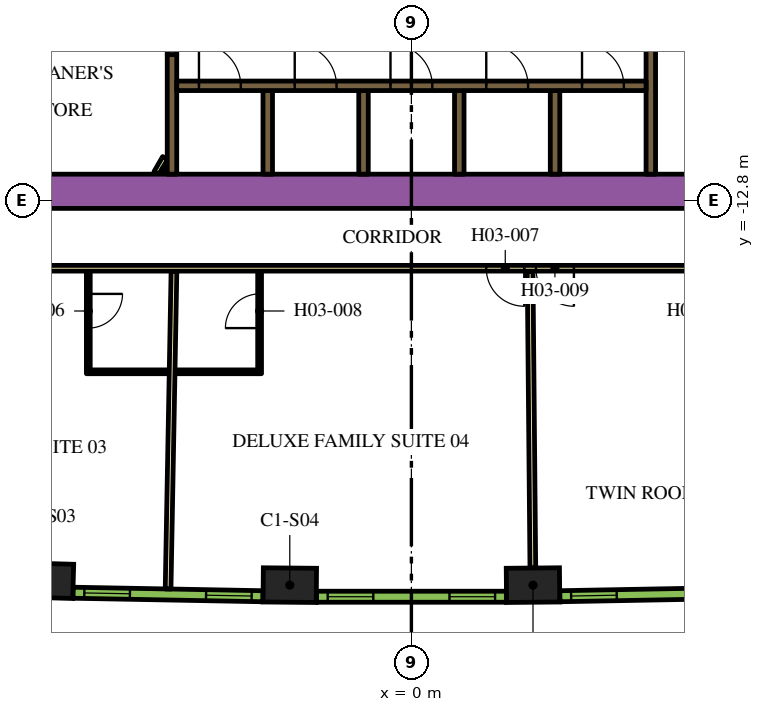
"""IFC4 building model, lengths in metres.
Left out: names, types, materials, properties, quantities, classifications, styles, units other than length and angle.
Written with IfcOpenShell. Run it as: python <this file> out.ifc"""

import sys

from ifc_helpers import new_model, si_unit, direction, frame, frame_2d, origin, origin_2d, place, context, subcontext, project, spatial, rectangle, extrude, element, fill, save


model = new_model("IFC4")
c1 = context("Model", 3, precision=1e-05, world=origin(), true_north=direction((0.0, 1.0)))
c2 = subcontext(c1, "Body", "Model", "MODEL_VIEW")
j1 = project(units=[si_unit("LENGTHUNIT", "METRE"), si_unit("PLANEANGLEUNIT", "RADIAN")], contexts=[c1])
p1 = place(None, origin())
s1 = spatial("IfcSite", under=j1, at=p1, CompositionType="ELEMENT")
p2 = place(p1, origin())
s2 = spatial("IfcBuilding", under=s1, at=p2, CompositionType="ELEMENT")
p3 = place(p2, frame((0.0, 0.0, 54.9)))
s3 = spatial("IfcBuildingStorey", under=s2, at=p3, CompositionType="ELEMENT", Elevation=54.9)
for number, where, z_axis, x_axis in (
    (1, (-9.599, -22.795, 0.0), (0.0, 0.0, 1.0), (1.0, -0.028, 0.0)),
    (2, (-3.2, -22.913, 0.0), (0.0, 0.0, 1.0), (1.0, -0.009, 0.0)),
    (3, (3.2, -22.913, 0.0), (0.0, 0.0, 1.0), (1.0, 0.009, 0.0)),
):
    element("IfcColumn", number, at=place(p3, frame(where, z_axis=z_axis, x_axis=x_axis)), inside=s3, PredefinedType="COLUMN", context=c2, shape_type="SweptSolid", body=[
        extrude(rectangle(XDim=1.4, YDim=0.9, at=origin_2d()), origin(), (0.0, 0.0, 1.0), 3.9),
    ])
p4 = place(p3, frame((-12.019, -12.55, 0.0), z_axis=(0.0, 0.0, 1.0), x_axis=(1.0, 0.0, 0.0)))
e4 = element("IfcWall", 4, at=p4, inside=s3, PredefinedType="SOLIDWALL", context=c2, shape_type="SweptSolid", body=[
    extrude(rectangle(XDim=21.63, YDim=0.9, at=frame_2d((10.815, 0.0))), origin(), (0.0, 0.0, 1.0), 3.9),
])
p5 = place(p3, frame((12.84, -9.261, 0.0), z_axis=(0.0, 0.0, 1.0), x_axis=(-0.866013990052, 0.500019768644, 0.0)))
e5 = element("IfcWall", 5, at=p5, inside=s3, PredefinedType="SOLIDWALL", context=c2, shape_type="SweptSolid", body=[
    extrude(rectangle(XDim=6.8, YDim=0.25, at=frame_2d((3.4, 0.0))), origin(), (0.0, 0.0, 1.0), 3.9),
])
p6 = place(p3, frame((-12.84, -9.261, 0.0), z_axis=(0.0, 0.0, 1.0), x_axis=(0.866016039709, 0.500016218704, 0.0)))
e6 = element("IfcWall", 6, at=p6, inside=s3, PredefinedType="SOLIDWALL", context=c2, shape_type="SweptSolid", body=[
    extrude(rectangle(XDim=7.05, YDim=0.25, at=frame_2d((3.525, 0.0))), origin(), (0.0, 0.0, 1.0), 3.9),
])
p7 = place(p3, frame((-3.78, -12.1, 0.0), z_axis=(0.0, 0.0, 1.0), x_axis=(0.0, 1.0, 0.0)))
e7 = element("IfcWall", 7, at=p7, inside=s3, PredefinedType="SOLIDWALL", context=c2, shape_type="SweptSolid", body=[
    extrude(rectangle(XDim=2.2, YDim=0.25, at=frame_2d((1.1, 0.0))), origin(), (0.0, 0.0, 1.0), 3.9),
])
p8 = place(p3, frame((-6.3, -12.1, 0.0), z_axis=(0.0, 0.0, 1.0), x_axis=(0.0, 1.0, 0.0)))
e8 = element("IfcWall", 8, at=p8, inside=s3, PredefinedType="SOLIDWALL", context=c2, shape_type="SweptSolid", body=[
    extrude(rectangle(XDim=3.146, YDim=0.25, at=frame_2d((1.573, 0.0))), origin(), (0.0, 0.0, 1.0), 3.9),
])
p9 = place(p3, frame((6.3, -8.67, 0.0), z_axis=(0.0, 0.0, 1.0), x_axis=(0.0, -1.0, 0.0)))
e9 = element("IfcWall", 9, at=p9, inside=s3, PredefinedType="SOLIDWALL", context=c2, shape_type="SweptSolid", body=[
    extrude(rectangle(XDim=3.43, YDim=0.25, at=frame_2d((1.715, 0.0))), origin(), (0.0, 0.0, 1.0), 3.9),
])
for number, where, z_axis, x_axis in (
    (10, (3.78, -12.1, 0.0), (0.0, 0.0, 1.0), (0.0, 1.0, 0.0)),
    (11, (1.26, -12.1, 0.0), (0.0, 0.0, 1.0), (0.0, 1.0, 0.0)),
    (12, (-1.26, -12.1, 0.0), (0.0, 0.0, 1.0), (0.0, 1.0, 0.0)),
):
    element("IfcWall", number, at=place(p3, frame(where, z_axis=z_axis, x_axis=x_axis)), inside=s3, PredefinedType="SOLIDWALL", context=c2, shape_type="SweptSolid", body=[
        extrude(rectangle(XDim=2.2, YDim=0.25, at=frame_2d((1.1, 0.0))), origin(), (0.0, 0.0, 1.0), 3.9),
    ])
p10 = place(p3, frame((-6.708, -12.068, 0.0), z_axis=(0.0, 0.0, 1.0), x_axis=(0.500000789788, 0.8660249478, 0.0)))
e13 = element("IfcWall", 13, at=p10, inside=s3, PredefinedType="PARTITIONING", context=c2, shape_type="SweptSolid", body=[
    extrude(rectangle(XDim=0.456, YDim=0.15, at=frame_2d((0.228, 0.0))), origin(), (0.0, 0.0, 1.0), 2.75),
])
p11 = place(p3, frame((-6.534, -12.068, 0.0), z_axis=(0.0, 0.0, 1.0), x_axis=(0.500240224089, 0.865886665912, 0.0)))
e14 = element("IfcWall", 14, at=p11, inside=s3, PredefinedType="PARTITIONING", context=c2, shape_type="SweptSolid", body=[
    extrude(rectangle(XDim=0.109, YDim=0.15, at=frame_2d((0.054, 0.0))), origin(), (0.0, 0.0, 1.0), 2.75),
])
p12 = place(p3, frame((-6.175, -9.775, 0.0), z_axis=(0.0, 0.0, 1.0), x_axis=(1.0, 0.0, 0.0)))
e15 = element("IfcWall", 15, at=p12, inside=s3, PredefinedType="SOLIDWALL", context=c2, shape_type="SweptSolid", body=[
    extrude(rectangle(XDim=12.35, YDim=0.25, at=frame_2d((6.175, 0.0))), origin(), (0.0, 0.0, 1.0), 3.9),
])
p13 = place(p12, frame((0.585, 0.0, 0.0)))
e16 = element("IfcOpeningElement", 16, at=p13, cuts=e15, PredefinedType="OPENING", context=c2, shape_type="SweptSolid", body=[
    extrude(rectangle(XDim=1.1, YDim=2.1, at=frame_2d((0.55, 1.05))), frame((0.0, 0.135, 0.0), z_axis=(0.0, -1.0, 0.0), x_axis=(1.0, 0.0, 0.0)), (0.0, 0.0, 1.0), 0.27),
])
p14 = place(p12, frame((3.105, 0.0, 0.0)))
e17 = element("IfcOpeningElement", 17, at=p14, cuts=e15, PredefinedType="OPENING", context=c2, shape_type="SweptSolid", body=[
    extrude(rectangle(XDim=1.1, YDim=2.1, at=frame_2d((0.55, 1.05))), frame((0.0, 0.135, 0.0), z_axis=(0.0, -1.0, 0.0), x_axis=(1.0, 0.0, 0.0)), (0.0, 0.0, 1.0), 0.27),
])
p15 = place(p12, frame((5.625, 0.0, 0.0)))
e18 = element("IfcOpeningElement", 18, at=p15, cuts=e15, PredefinedType="OPENING", context=c2, shape_type="SweptSolid", body=[
    extrude(rectangle(XDim=1.1, YDim=2.1, at=frame_2d((0.55, 1.05))), frame((0.0, 0.135, 0.0), z_axis=(0.0, -1.0, 0.0), x_axis=(1.0, 0.0, 0.0)), (0.0, 0.0, 1.0), 0.27),
])
p16 = place(p12, frame((8.145, 0.0, 0.0)))
e19 = element("IfcOpeningElement", 19, at=p16, cuts=e15, PredefinedType="OPENING", context=c2, shape_type="SweptSolid", body=[
    extrude(rectangle(XDim=1.1, YDim=2.1, at=frame_2d((0.55, 1.05))), frame((0.0, 0.135, 0.0), z_axis=(0.0, -1.0, 0.0), x_axis=(1.0, 0.0, 0.0)), (0.0, 0.0, 1.0), 0.27),
])
p17 = place(p12, frame((10.665, 0.0, 0.0)))
e20 = element("IfcOpeningElement", 20, at=p17, cuts=e15, PredefinedType="OPENING", context=c2, shape_type="SweptSolid", body=[
    extrude(rectangle(XDim=1.1, YDim=2.1, at=frame_2d((0.55, 1.05))), frame((0.0, 0.135, 0.0), z_axis=(0.0, -1.0, 0.0), x_axis=(1.0, 0.0, 0.0)), (0.0, 0.0, 1.0), 0.27),
])
p18 = place(p3, frame((-6.3, -7.154, 0.0), z_axis=(0.0, 0.0, 1.0), x_axis=(0.0, -1.0, 0.0)))
e21 = element("IfcWall", 21, at=p18, inside=s3, PredefinedType="SOLIDWALL", context=c2, shape_type="SweptSolid", body=[
    extrude(rectangle(XDim=1.8, YDim=0.25, at=frame_2d((0.9, 0.0))), origin(), (0.0, 0.0, 1.0), 3.9),
])
p19 = place(p18, frame((0.45, 0.0, 0.0)))
e22 = element("IfcOpeningElement", 22, at=p19, cuts=e21, PredefinedType="OPENING", context=c2, shape_type="SweptSolid", body=[
    extrude(rectangle(XDim=0.9, YDim=2.1, at=frame_2d((0.45, 1.05))), frame((0.0, 0.135, 0.0), z_axis=(0.0, -1.0, 0.0), x_axis=(1.0, 0.0, 0.0)), (0.0, 0.0, 1.0), 0.27),
])
p20 = place(p3, frame((12.918, -14.575, 0.0), z_axis=(0.0, 0.0, 1.0), x_axis=(-1.0, 0.0, 0.0)))
e23 = element("IfcWall", 23, at=p20, inside=s3, PredefinedType="PARTITIONING", context=c2, shape_type="SweptSolid", body=[
    extrude(rectangle(XDim=25.766, YDim=0.15, at=frame_2d((12.883, 0.0))), origin(), (0.0, 0.0, 1.0), 2.75),
])
p21 = place(p20, frame((24.586, 0.0, 0.0)))
e24 = element("IfcOpeningElement", 24, at=p21, cuts=e23, PredefinedType="OPENING", context=c2, shape_type="SweptSolid", body=[
    extrude(rectangle(XDim=1.0, YDim=2.1, at=frame_2d((0.5, 1.05))), frame((0.0, 0.085, 0.0), z_axis=(0.0, -1.0, 0.0), x_axis=(1.0, 0.0, 0.0)), (0.0, 0.0, 1.0), 0.17),
])
p22 = place(p20, frame((9.948, 0.0, 0.0)))
e25 = element("IfcOpeningElement", 25, at=p22, cuts=e23, PredefinedType="OPENING", context=c2, shape_type="SweptSolid", body=[
    extrude(rectangle(XDim=1.0, YDim=2.1, at=frame_2d((0.5, 1.05))), frame((0.0, 0.085, 0.0), z_axis=(0.0, -1.0, 0.0), x_axis=(1.0, 0.0, 0.0)), (0.0, 0.0, 1.0), 0.17),
])
p23 = place(p20, frame((8.642, 0.0, 0.0)))
e26 = element("IfcOpeningElement", 26, at=p23, cuts=e23, PredefinedType="OPENING", context=c2, shape_type="SweptSolid", body=[
    extrude(rectangle(XDim=1.0, YDim=2.1, at=frame_2d((0.5, 1.05))), frame((0.0, 0.085, 0.0), z_axis=(0.0, -1.0, 0.0), x_axis=(1.0, 0.0, 0.0)), (0.0, 0.0, 1.0), 0.17),
])
p24 = place(p20, frame((0.18, 0.0, 0.0)))
e27 = element("IfcOpeningElement", 27, at=p24, cuts=e23, PredefinedType="OPENING", context=c2, shape_type="SweptSolid", body=[
    extrude(rectangle(XDim=1.0, YDim=2.1, at=frame_2d((0.5, 1.05))), frame((0.0, 0.085, 0.0), z_axis=(0.0, -1.0, 0.0), x_axis=(1.0, 0.0, 0.0)), (0.0, 0.0, 1.0), 0.17),
])
p25 = place(p3, frame((-6.402, -23.014, 0.0), z_axis=(0.0, 0.0, 1.0), x_axis=(0.01849587109, 0.999828936745, 0.0)))
e28 = element("IfcWall", 28, at=p25, inside=s3, PredefinedType="PARTITIONING", context=c2, shape_type="SweptSolid", body=[
    extrude(rectangle(XDim=8.355, YDim=0.15, at=frame_2d((4.178, 0.0))), origin(), (0.0, 0.0, 1.0), 2.75),
])
p26 = place(p3, frame((3.196, -22.463, 0.0), z_axis=(0.0, 0.0, 1.0), x_axis=(-0.00926060032, 0.999957119721, 0.0)))
e29 = element("IfcWall", 29, at=p26, inside=s3, PredefinedType="PARTITIONING", context=c2, shape_type="SweptSolid", body=[
    extrude(rectangle(XDim=7.803, YDim=0.15, at=frame_2d((3.902, 0.0))), origin(), (0.0, 0.0, 1.0), 2.75),
])
p27 = place(p3, frame((-8.502, -14.65, 0.0), z_axis=(0.0, 0.0, 1.0), x_axis=(0.0, -1.0, 0.0)))
e30 = element("IfcWall", 30, at=p27, inside=s3, PredefinedType="PARTITIONING", context=c2, shape_type="SweptSolid", body=[
    extrude(rectangle(XDim=2.7, YDim=0.1, at=frame_2d((1.35, 0.0))), origin(), (0.0, 0.0, 1.0), 2.75),
])
p28 = place(p27, frame((0.6, 0.0, 0.0)))
e31 = element("IfcOpeningElement", 31, at=p28, cuts=e30, PredefinedType="OPENING", context=c2, shape_type="SweptSolid", body=[
    extrude(rectangle(XDim=0.9, YDim=2.1, at=frame_2d((0.45, 1.05))), frame((0.0, 0.06, 0.0), z_axis=(0.0, -1.0, 0.0), x_axis=(1.0, 0.0, 0.0)), (0.0, 0.0, 1.0), 0.12),
])
p29 = place(p3, frame((-8.452, -17.3, 0.0), z_axis=(0.0, 0.0, 1.0), x_axis=(1.0, 0.0, 0.0)))
e32 = element("IfcWall", 32, at=p29, inside=s3, PredefinedType="PARTITIONING", context=c2, shape_type="SweptSolid", body=[
    extrude(rectangle(XDim=2.07, YDim=0.1, at=frame_2d((1.035, 0.0))), origin(), (0.0, 0.0, 1.0), 2.75),
])
p30 = place(p3, frame((-3.994, -17.35, 0.0), z_axis=(0.0, 0.0, 1.0), x_axis=(0.0, 1.0, 0.0)))
e33 = element("IfcWall", 33, at=p30, inside=s3, PredefinedType="PARTITIONING", context=c2, shape_type="SweptSolid", body=[
    extrude(rectangle(XDim=2.7, YDim=0.1, at=frame_2d((1.35, 0.0))), origin(), (0.0, 0.0, 1.0), 2.75),
])
p31 = place(p30, frame((1.2, 0.0, 0.0)))
e34 = element("IfcOpeningElement", 34, at=p31, cuts=e33, PredefinedType="OPENING", context=c2, shape_type="SweptSolid", body=[
    extrude(rectangle(XDim=0.9, YDim=2.1, at=frame_2d((0.45, 1.05))), frame((0.0, 0.06, 0.0), z_axis=(0.0, -1.0, 0.0), x_axis=(1.0, 0.0, 0.0)), (0.0, 0.0, 1.0), 0.12),
])
p32 = place(p3, frame((-4.044, -17.3, 0.0), z_axis=(0.0, 0.0, 1.0), x_axis=(-1.0, 0.0, 0.0)))
e35 = element("IfcWall", 35, at=p32, inside=s3, PredefinedType="PARTITIONING", context=c2, shape_type="SweptSolid", body=[
    extrude(rectangle(XDim=2.17, YDim=0.1, at=frame_2d((1.085, 0.0))), origin(), (0.0, 0.0, 1.0), 2.75),
])
p33 = place(p3, frame((-8.904, -23.113, 0.0), z_axis=(0.0, 0.0, 1.0), x_axis=(0.999829529479, -0.018463801951, 0.0)))
e36 = element("IfcWall", 36, at=p33, inside=s3, PredefinedType="SOLIDWALL", context=c2, shape_type="SweptSolid", body=[
    extrude(rectangle(XDim=4.998, YDim=0.29, at=frame_2d((2.499, 0.0))), origin(), (0.0, 0.0, 1.0), 3.65),
])
p34 = place(p33, frame((0.297, 0.0, 0.9)))
e37 = element("IfcOpeningElement", 37, at=p34, cuts=e36, PredefinedType="OPENING", context=c2, shape_type="SweptSolid", body=[
    extrude(rectangle(XDim=1.2, YDim=2.15, at=frame_2d((0.6, 1.075))), frame((0.0, 0.155, 0.0), z_axis=(0.0, -1.0, 0.0), x_axis=(1.0, 0.0, 0.0)), (0.0, 0.0, 1.0), 0.31),
])
p35 = place(p33, frame((3.501, 0.0, 0.9)))
e38 = element("IfcOpeningElement", 38, at=p35, cuts=e36, PredefinedType="OPENING", context=c2, shape_type="SweptSolid", body=[
    extrude(rectangle(XDim=1.2, YDim=2.15, at=frame_2d((0.6, 1.075))), frame((0.0, 0.155, 0.0), z_axis=(0.0, -1.0, 0.0), x_axis=(1.0, 0.0, 0.0)), (0.0, 0.0, 1.0), 0.31),
])
p36 = place(p3, frame((-2.499, -23.218, 0.0), z_axis=(0.0, 0.0, 1.0), x_axis=(1.0, 0.0, 0.0)))
e39 = element("IfcWall", 39, at=p36, inside=s3, PredefinedType="SOLIDWALL", context=c2, shape_type="SweptSolid", body=[
    extrude(rectangle(XDim=4.998, YDim=0.29, at=frame_2d((2.499, 0.0))), origin(), (0.0, 0.0, 1.0), 3.65),
])
p37 = place(p36, frame((0.297, 0.0, 0.9)))
e40 = element("IfcOpeningElement", 40, at=p37, cuts=e39, PredefinedType="OPENING", context=c2, shape_type="SweptSolid", body=[
    extrude(rectangle(XDim=1.2, YDim=2.15, at=frame_2d((0.6, 1.075))), frame((0.0, 0.155, 0.0), z_axis=(0.0, -1.0, 0.0), x_axis=(1.0, 0.0, 0.0)), (0.0, 0.0, 1.0), 0.31),
])
p38 = place(p36, frame((3.501, 0.0, 0.9)))
e41 = element("IfcOpeningElement", 41, at=p38, cuts=e39, PredefinedType="OPENING", context=c2, shape_type="SweptSolid", body=[
    extrude(rectangle(XDim=1.2, YDim=2.15, at=frame_2d((0.6, 1.075))), frame((0.0, 0.155, 0.0), z_axis=(0.0, -1.0, 0.0), x_axis=(1.0, 0.0, 0.0)), (0.0, 0.0, 1.0), 0.31),
])
p39 = place(p3, frame((3.906, -23.205, 0.0), z_axis=(0.0, 0.0, 1.0), x_axis=(0.999829529479, 0.018463801951, 0.0)))
e42 = element("IfcWall", 42, at=p39, inside=s3, PredefinedType="SOLIDWALL", context=c2, shape_type="SweptSolid", body=[
    extrude(rectangle(XDim=4.998, YDim=0.29, at=frame_2d((2.499, 0.0))), origin(), (0.0, 0.0, 1.0), 3.65),
])
p40 = place(p39, frame((0.297, 0.0, 0.9)))
e43 = element("IfcOpeningElement", 43, at=p40, cuts=e42, PredefinedType="OPENING", context=c2, shape_type="SweptSolid", body=[
    extrude(rectangle(XDim=1.2, YDim=2.15, at=frame_2d((0.6, 1.075))), frame((0.0, 0.155, 0.0), z_axis=(0.0, -1.0, 0.0), x_axis=(1.0, 0.0, 0.0)), (0.0, 0.0, 1.0), 0.31),
])
p41 = place(p39, frame((3.501, 0.0, 0.9)))
e44 = element("IfcOpeningElement", 44, at=p41, cuts=e42, PredefinedType="OPENING", context=c2, shape_type="SweptSolid", body=[
    extrude(rectangle(XDim=1.2, YDim=2.15, at=frame_2d((0.6, 1.075))), frame((0.0, 0.155, 0.0), z_axis=(0.0, -1.0, 0.0), x_axis=(1.0, 0.0, 0.0)), (0.0, 0.0, 1.0), 0.31),
])
p42 = place(p13, origin())
e45 = element("IfcDoor", 45, at=p42, inside=s3, OperationType="DOUBLE_DOOR_SLIDING", PredefinedType="DOOR", context=c2, shape_type="SweptSolid", body=[
    extrude(rectangle(XDim=1.1, YDim=2.1, at=frame_2d((0.55, 1.05))), frame((0.0, 0.025, 0.0), z_axis=(0.0, -1.0, 0.0), x_axis=(1.0, 0.0, 0.0)), (0.0, 0.0, 1.0), 0.05),
])
fill(e16, e45)
p43 = place(p14, origin())
e46 = element("IfcDoor", 46, at=p43, inside=s3, OperationType="DOUBLE_DOOR_SLIDING", PredefinedType="DOOR", context=c2, shape_type="SweptSolid", body=[
    extrude(rectangle(XDim=1.1, YDim=2.1, at=frame_2d((0.55, 1.05))), frame((0.0, 0.025, 0.0), z_axis=(0.0, -1.0, 0.0), x_axis=(1.0, 0.0, 0.0)), (0.0, 0.0, 1.0), 0.05),
])
fill(e17, e46)
p44 = place(p15, origin())
e47 = element("IfcDoor", 47, at=p44, inside=s3, OperationType="DOUBLE_DOOR_SLIDING", PredefinedType="DOOR", context=c2, shape_type="SweptSolid", body=[
    extrude(rectangle(XDim=1.1, YDim=2.1, at=frame_2d((0.55, 1.05))), frame((0.0, 0.025, 0.0), z_axis=(0.0, -1.0, 0.0), x_axis=(1.0, 0.0, 0.0)), (0.0, 0.0, 1.0), 0.05),
])
fill(e18, e47)
p45 = place(p16, origin())
e48 = element("IfcDoor", 48, at=p45, inside=s3, OperationType="DOUBLE_DOOR_SLIDING", PredefinedType="DOOR", context=c2, shape_type="SweptSolid", body=[
    extrude(rectangle(XDim=1.1, YDim=2.1, at=frame_2d((0.55, 1.05))), frame((0.0, 0.025, 0.0), z_axis=(0.0, -1.0, 0.0), x_axis=(1.0, 0.0, 0.0)), (0.0, 0.0, 1.0), 0.05),
])
fill(e19, e48)
p46 = place(p17, origin())
e49 = element("IfcDoor", 49, at=p46, inside=s3, OperationType="DOUBLE_DOOR_SLIDING", PredefinedType="DOOR", context=c2, shape_type="SweptSolid", body=[
    extrude(rectangle(XDim=1.1, YDim=2.1, at=frame_2d((0.55, 1.05))), frame((0.0, 0.025, 0.0), z_axis=(0.0, -1.0, 0.0), x_axis=(1.0, 0.0, 0.0)), (0.0, 0.0, 1.0), 0.05),
])
fill(e20, e49)
p47 = place(p28, origin())
e50 = element("IfcDoor", 50, at=p47, inside=s3, OperationType="SINGLE_SWING_RIGHT", PredefinedType="DOOR", context=c2, shape_type="SweptSolid", body=[
    extrude(rectangle(XDim=0.9, YDim=2.1, at=frame_2d((0.45, 1.05))), frame((0.0, 0.025, 0.0), z_axis=(0.0, -1.0, 0.0), x_axis=(1.0, 0.0, 0.0)), (0.0, 0.0, 1.0), 0.05),
])
fill(e31, e50)
p48 = place(p22, origin())
e51 = element("IfcDoor", 51, at=p48, inside=s3, OperationType="SINGLE_SWING_LEFT", PredefinedType="DOOR", context=c2, shape_type="SweptSolid", body=[
    extrude(rectangle(XDim=1.0, YDim=2.1, at=frame_2d((0.5, 1.05))), frame((0.0, 0.025, 0.0), z_axis=(0.0, -1.0, 0.0), x_axis=(1.0, 0.0, 0.0)), (0.0, 0.0, 1.0), 0.05),
])
fill(e25, e51)
p49 = place(p31, origin())
e52 = element("IfcDoor", 52, at=p49, inside=s3, OperationType="SINGLE_SWING_LEFT", PredefinedType="DOOR", context=c2, shape_type="SweptSolid", body=[
    extrude(rectangle(XDim=0.9, YDim=2.1, at=frame_2d((0.45, 1.05))), frame((0.0, 0.025, 0.0), z_axis=(0.0, -1.0, 0.0), x_axis=(1.0, 0.0, 0.0)), (0.0, 0.0, 1.0), 0.05),
])
fill(e34, e52)
p50 = place(p23, origin())
e53 = element("IfcDoor", 53, at=p50, inside=s3, OperationType="SINGLE_SWING_RIGHT", PredefinedType="DOOR", context=c2, shape_type="SweptSolid", body=[
    extrude(rectangle(XDim=1.0, YDim=2.1, at=frame_2d((0.5, 1.05))), frame((0.0, 0.025, 0.0), z_axis=(0.0, -1.0, 0.0), x_axis=(1.0, 0.0, 0.0)), (0.0, 0.0, 1.0), 0.05),
])
fill(e26, e53)
p51 = place(p34, origin())
e54 = element("IfcWindow", 54, at=p51, inside=s3, PartitioningType="DOUBLE_PANEL_VERTICAL", PredefinedType="WINDOW", context=c2, shape_type="SweptSolid", body=[
    extrude(rectangle(XDim=1.2, YDim=2.15, at=frame_2d((0.6, 1.075))), frame((0.0, 0.015, 0.0), z_axis=(0.0, -1.0, 0.0), x_axis=(1.0, 0.0, 0.0)), (0.0, 0.0, 1.0), 0.06),
])
fill(e37, e54)
p52 = place(p35, origin())
e55 = element("IfcWindow", 55, at=p52, inside=s3, PartitioningType="DOUBLE_PANEL_VERTICAL", PredefinedType="WINDOW", context=c2, shape_type="SweptSolid", body=[
    extrude(rectangle(XDim=1.2, YDim=2.15, at=frame_2d((0.6, 1.075))), frame((0.0, 0.015, 0.0), z_axis=(0.0, -1.0, 0.0), x_axis=(1.0, 0.0, 0.0)), (0.0, 0.0, 1.0), 0.06),
])
fill(e38, e55)
p53 = place(p37, origin())
e56 = element("IfcWindow", 56, at=p53, inside=s3, PartitioningType="DOUBLE_PANEL_VERTICAL", PredefinedType="WINDOW", context=c2, shape_type="SweptSolid", body=[
    extrude(rectangle(XDim=1.2, YDim=2.15, at=frame_2d((0.6, 1.075))), frame((0.0, 0.015, 0.0), z_axis=(0.0, -1.0, 0.0), x_axis=(1.0, 0.0, 0.0)), (0.0, 0.0, 1.0), 0.06),
])
fill(e40, e56)
p54 = place(p38, origin())
e57 = element("IfcWindow", 57, at=p54, inside=s3, PartitioningType="DOUBLE_PANEL_VERTICAL", PredefinedType="WINDOW", context=c2, shape_type="SweptSolid", body=[
    extrude(rectangle(XDim=1.2, YDim=2.15, at=frame_2d((0.6, 1.075))), frame((0.0, 0.015, 0.0), z_axis=(0.0, -1.0, 0.0), x_axis=(1.0, 0.0, 0.0)), (0.0, 0.0, 1.0), 0.06),
])
fill(e41, e57)
p55 = place(p40, origin())
e58 = element("IfcWindow", 58, at=p55, inside=s3, PartitioningType="DOUBLE_PANEL_VERTICAL", PredefinedType="WINDOW", context=c2, shape_type="SweptSolid", body=[
    extrude(rectangle(XDim=1.2, YDim=2.15, at=frame_2d((0.6, 1.075))), frame((0.0, 0.015, 0.0), z_axis=(0.0, -1.0, 0.0), x_axis=(1.0, 0.0, 0.0)), (0.0, 0.0, 1.0), 0.06),
])
fill(e43, e58)
save(model, sys.argv[1])
